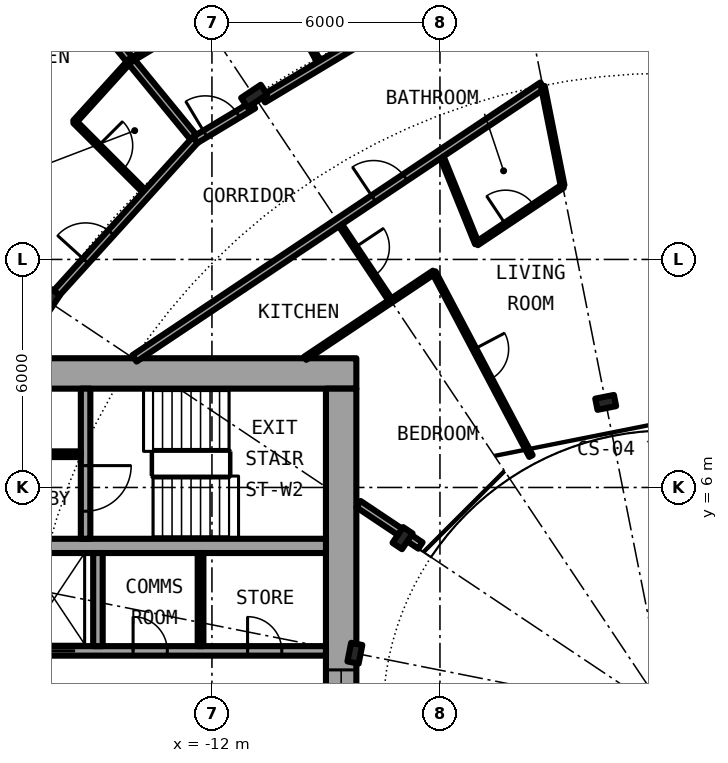
"""IFC4 building model, lengths in metres.
Left out: names, types, materials, properties, quantities, classifications, styles, units other than length and angle.
Written with IfcOpenShell. Run it as: python <this file> out.ifc"""

import sys

from ifc_helpers import new_model, si_unit, direction, frame, frame_2d, origin, origin_2d, place, context, subcontext, project, spatial, rectangle, i_section, extrude, element, fill, save


model = new_model("IFC4")
c1 = context("Model", 3, precision=1e-05, world=origin(), true_north=direction((0.0, 1.0)))
c2 = subcontext(c1, "Body", "Model", "MODEL_VIEW")
j1 = project(units=[si_unit("LENGTHUNIT", "METRE"), si_unit("PLANEANGLEUNIT", "RADIAN")], contexts=[c1])
p1 = place(None, origin())
s1 = spatial("IfcSite", under=j1, at=p1, CompositionType="ELEMENT")
p2 = place(p1, origin())
s2 = spatial("IfcBuilding", under=s1, at=p2, CompositionType="ELEMENT")
p3 = place(p2, frame((0.0, 0.0, 31.95)))
s3 = spatial("IfcBuildingStorey", under=s2, at=p3, CompositionType="ELEMENT", Elevation=31.95)
for number, where, z_axis, x_axis in (
    (1, (-10.889, 16.297, 0.0), (0.0, 0.0, 1.0), (-0.556, 0.831, 0.0)),
    (2, (-16.297, 10.889, 0.0), (0.0, 0.0, 1.0), (-0.831, 0.556, 0.0)),
):
    element("IfcColumn", number, at=place(p3, frame(where, z_axis=z_axis, x_axis=x_axis)), inside=s3, PredefinedType="COLUMN", context=c2, shape_type="SweptSolid", body=[
        extrude(i_section(OverallWidth=0.305, OverallDepth=0.62, WebThickness=0.021, FlangeThickness=0.04, FilletRadius=0.027, at=origin_2d()), origin(), (0.0, 0.0, 1.0), 3.05),
    ])
for number, where, z_axis, x_axis in (
    (3, (-1.639, 8.239, 0.0), (0.0, 0.0, 1.0), (-0.195, 0.981, 0.0)),
    (4, (-6.984, 4.667, 0.0), (0.0, 0.0, 1.0), (-0.831, 0.556, 0.0)),
    (5, (-8.239, 1.639, 0.0), (0.0, 0.0, 1.0), (-0.981, 0.195, 0.0)),
):
    element("IfcColumn", number, at=place(p3, frame(where, z_axis=z_axis, x_axis=x_axis)), inside=s3, PredefinedType="COLUMN", context=c2, shape_type="SweptSolid", body=[
        extrude(i_section(OverallWidth=0.3, OverallDepth=0.5, WebThickness=0.014, FlangeThickness=0.028, FilletRadius=0.027, at=origin_2d()), origin(), (0.0, 0.0, 1.0), 3.05),
    ])
p4 = place(p3, frame((-8.2, 9.0, 0.0), z_axis=(0.0, 0.0, 1.0), x_axis=(-1.0, 0.0, 0.0)))
e6 = element("IfcWall", 6, at=p4, inside=s3, PredefinedType="SHEAR", context=c2, shape_type="SweptSolid", body=[
    extrude(rectangle(XDim=14.2, YDim=0.8, at=frame_2d((7.1, 0.0))), origin(), (0.0, 0.0, 1.0), 3.05),
])
p5 = place(p4, frame((11.675, 0.0, 0.0)))
e7 = element("IfcOpeningElement", 7, at=p5, cuts=e6, PredefinedType="OPENING", context=c2, shape_type="SweptSolid", body=[
    extrude(rectangle(XDim=1.2, YDim=2.3, at=frame_2d((0.6, 1.15))), frame((0.0, 0.41, 0.0), z_axis=(0.0, -1.0, 0.0), x_axis=(1.0, 0.0, 0.0)), (0.0, 0.0, 1.0), 0.82),
])
p6 = place(p3, frame((-8.6, 8.6, 0.0), z_axis=(0.0, 0.0, 1.0), x_axis=(0.0, -1.0, 0.0)))
e8 = element("IfcWall", 8, at=p6, inside=s3, PredefinedType="SHEAR", context=c2, shape_type="SweptSolid", body=[
    extrude(rectangle(XDim=17.2, YDim=0.8, at=frame_2d((8.6, 0.0))), origin(), (0.0, 0.0, 1.0), 3.05),
])
p7 = place(p6, frame((7.4, 0.0, 0.1)))
e9 = element("IfcOpeningElement", 9, at=p7, cuts=e8, PredefinedType="OPENING", context=c2, shape_type="SweptSolid", body=[
    extrude(rectangle(XDim=2.4, YDim=2.2, at=frame_2d((1.2, 1.1))), frame((0.0, 0.41, 0.0), z_axis=(0.0, -1.0, 0.0), x_axis=(1.0, 0.0, 0.0)), (0.0, 0.0, 1.0), 0.82),
])
p8 = place(p3, frame((-19.15, 1.7, 0.0), z_axis=(0.0, 0.0, 1.0), x_axis=(1.0, 0.0, 0.0)))
e10 = element("IfcWall", 10, at=p8, inside=s3, PredefinedType="SHEAR", context=c2, shape_type="SweptSolid", body=[
    extrude(rectangle(XDim=10.15, YDim=0.25, at=frame_2d((5.075, 0.0))), origin(), (0.0, 0.0, 1.0), 3.05),
])
p9 = place(p8, frame((2.45, 0.0, 0.0)))
e11 = element("IfcOpeningElement", 11, at=p9, cuts=e10, PredefinedType="OPENING", context=c2, shape_type="SweptSolid", body=[
    extrude(rectangle(XDim=1.1, YDim=2.3, at=frame_2d((0.55, 1.15))), frame((0.0, 0.135, 0.0), z_axis=(0.0, -1.0, 0.0), x_axis=(1.0, 0.0, 0.0)), (0.0, 0.0, 1.0), 0.27),
])
p10 = place(p8, frame((8.087, 0.0, 0.0)))
e12 = element("IfcOpeningElement", 12, at=p10, cuts=e10, PredefinedType="OPENING", context=c2, shape_type="SweptSolid", body=[
    extrude(rectangle(XDim=0.9, YDim=2.3, at=frame_2d((0.45, 1.15))), frame((0.0, 0.135, 0.0), z_axis=(0.0, -1.0, 0.0), x_axis=(1.0, 0.0, 0.0)), (0.0, 0.0, 1.0), 0.27),
])
p11 = place(p8, frame((5.075, 0.0, 0.0)))
e13 = element("IfcOpeningElement", 13, at=p11, cuts=e10, PredefinedType="OPENING", context=c2, shape_type="SweptSolid", body=[
    extrude(rectangle(XDim=0.9, YDim=2.3, at=frame_2d((0.45, 1.15))), frame((0.0, 0.135, 0.0), z_axis=(0.0, -1.0, 0.0), x_axis=(1.0, 0.0, 0.0)), (0.0, 0.0, 1.0), 0.27),
])
p12 = place(p3, frame((-9.0, 4.462, 0.0), z_axis=(0.0, 0.0, 1.0), x_axis=(-1.0, 0.0, 0.0)))
e14 = element("IfcWall", 14, at=p12, inside=s3, PredefinedType="SHEAR", context=c2, shape_type="SweptSolid", body=[
    extrude(rectangle(XDim=10.15, YDim=0.375, at=frame_2d((5.075, 0.0))), origin(), (0.0, 0.0, 1.0), 3.05),
])
p13 = place(p3, frame((-15.325, 8.6, 0.0), z_axis=(0.0, 0.0, 1.0), x_axis=(0.0, -1.0, 0.0)))
e15 = element("IfcWall", 15, at=p13, inside=s3, PredefinedType="SHEAR", context=c2, shape_type="SweptSolid", body=[
    extrude(rectangle(XDim=3.95, YDim=0.25, at=frame_2d((1.975, 0.0))), origin(), (0.0, 0.0, 1.0), 3.05),
])
p14 = place(p13, frame((2.025, 0.0, 0.0)))
e16 = element("IfcOpeningElement", 16, at=p14, cuts=e15, PredefinedType="OPENING", context=c2, shape_type="SweptSolid", body=[
    extrude(rectangle(XDim=1.2, YDim=2.3, at=frame_2d((0.6, 1.15))), frame((0.0, 0.135, 0.0), z_axis=(0.0, -1.0, 0.0), x_axis=(1.0, 0.0, 0.0)), (0.0, 0.0, 1.0), 0.27),
])
p15 = place(p3, frame((-15.0, 1.825, 0.0), z_axis=(0.0, 0.0, 1.0), x_axis=(0.0, 1.0, 0.0)))
e17 = element("IfcWall", 17, at=p15, inside=s3, PredefinedType="SOLIDWALL", context=c2, shape_type="SweptSolid", body=[
    extrude(rectangle(XDim=2.45, YDim=0.25, at=frame_2d((1.225, 0.0))), origin(), (0.0, 0.0, 1.0), 2.7),
])
p16 = place(p3, frame((-12.3, 1.825, 0.0), z_axis=(0.0, 0.0, 1.0), x_axis=(0.0, 1.0, 0.0)))
e18 = element("IfcWall", 18, at=p16, inside=s3, PredefinedType="PARTITIONING", context=c2, shape_type="SweptSolid", body=[
    extrude(rectangle(XDim=2.45, YDim=0.15, at=frame_2d((1.225, 0.0))), origin(), (0.0, 0.0, 1.0), 2.7),
])
p17 = place(p3, frame((-15.45, 6.875, 0.0), z_axis=(0.0, 0.0, 1.0), x_axis=(-1.0, 0.0, 0.0)))
e19 = element("IfcWall", 19, at=p17, inside=s3, PredefinedType="PARTITIONING", context=c2, shape_type="SweptSolid", body=[
    extrude(rectangle(XDim=3.7, YDim=0.15, at=frame_2d((1.85, 0.0))), origin(), (0.0, 0.0, 1.0), 2.7),
])
p18 = place(p17, frame((1.4, 0.0, 0.0)))
e20 = element("IfcOpeningElement", 20, at=p18, cuts=e19, PredefinedType="OPENING", context=c2, shape_type="SweptSolid", body=[
    extrude(rectangle(XDim=0.9, YDim=2.3, at=frame_2d((0.45, 1.15))), frame((0.0, 0.085, 0.0), z_axis=(0.0, -1.0, 0.0), x_axis=(1.0, 0.0, 0.0)), (0.0, 0.0, 1.0), 0.17),
])
p19 = place(p3, frame((-17.24, 21.007, 0.0), z_axis=(0.0, 0.0, 1.0), x_axis=(0.634381303318, -0.773020285633, 0.0)))
e21 = element("IfcWall", 21, at=p19, inside=s3, PredefinedType="PARTITIONING", context=c2, shape_type="SweptSolid", body=[
    extrude(rectangle(XDim=7.576, YDim=0.2, at=frame_2d((3.788, 0.0))), origin(), (0.0, 0.0, 1.0), 2.7),
])
p20 = place(p3, frame((-15.612, 15.622, 0.0), z_axis=(0.0, 0.0, 1.0), x_axis=(0.706741540154, -0.707471833659, 0.0)))
e22 = element("IfcWall", 22, at=p20, inside=s3, PredefinedType="PARTITIONING", context=c2, shape_type="SweptSolid", body=[
    extrude(rectangle(XDim=2.674, YDim=0.1, at=frame_2d((1.337, 0.0))), origin(), (0.0, 0.0, 1.0), 2.7),
])
p21 = place(p20, frame((0.887, 0.0, 0.0)))
e23 = element("IfcOpeningElement", 23, at=p21, cuts=e22, PredefinedType="OPENING", context=c2, shape_type="SweptSolid", body=[
    extrude(rectangle(XDim=0.9, YDim=2.3, at=frame_2d((0.45, 1.15))), frame((0.0, 0.06, 0.0), z_axis=(0.0, -1.0, 0.0), x_axis=(1.0, 0.0, 0.0)), (0.0, 0.0, 1.0), 0.12),
])
p22 = place(p3, frame((-10.405, 19.481, 0.0), z_axis=(0.0, 0.0, 1.0), x_axis=(0.471151994359, -0.882052038267, 0.0)))
e24 = element("IfcWall", 24, at=p22, inside=s3, PredefinedType="PARTITIONING", context=c2, shape_type="SweptSolid", body=[
    extrude(rectangle(XDim=2.674, YDim=0.1, at=frame_2d((1.337, 0.0))), origin(), (0.0, 0.0, 1.0), 2.7),
])
p23 = place(p22, frame((0.887, 0.0, 0.0)))
e25 = element("IfcOpeningElement", 25, at=p23, cuts=e24, PredefinedType="OPENING", context=c2, shape_type="SweptSolid", body=[
    extrude(rectangle(XDim=0.9, YDim=2.3, at=frame_2d((0.45, 1.15))), frame((0.0, 0.06, 0.0), z_axis=(0.0, -1.0, 0.0), x_axis=(1.0, 0.0, 0.0)), (0.0, 0.0, 1.0), 0.12),
])
p24 = place(p3, frame((-8.674, 12.982, 0.0), z_axis=(0.0, 0.0, 1.0), x_axis=(0.555355163998, -0.831613276602, 0.0)))
e26 = element("IfcWall", 26, at=p24, inside=s3, PredefinedType="PARTITIONING", context=c2, shape_type="SweptSolid", body=[
    extrude(rectangle(XDim=2.494, YDim=0.1, at=frame_2d((1.247, 0.0))), origin(), (0.0, 0.0, 1.0), 2.7),
])
p25 = place(p24, frame((0.797, 0.0, 0.0)))
e27 = element("IfcOpeningElement", 27, at=p25, cuts=e26, PredefinedType="OPENING", context=c2, shape_type="SweptSolid", body=[
    extrude(rectangle(XDim=0.9, YDim=2.3, at=frame_2d((0.45, 1.15))), frame((0.0, 0.06, 0.0), z_axis=(0.0, -1.0, 0.0), x_axis=(1.0, 0.0, 0.0)), (0.0, 0.0, 1.0), 0.12),
])
p26 = place(p3, frame((-6.16, 11.663, 0.0), z_axis=(0.0, 0.0, 1.0), x_axis=(0.466976820365, -0.884269556889, 0.0)))
e28 = element("IfcWall", 28, at=p26, inside=s3, PredefinedType="PARTITIONING", context=c2, shape_type="SweptSolid", body=[
    extrude(rectangle(XDim=5.469, YDim=0.1, at=frame_2d((2.735, 0.0))), origin(), (0.0, 0.0, 1.0), 2.7),
])
p27 = place(p26, frame((2.285, 0.0, 0.0)))
e29 = element("IfcOpeningElement", 29, at=p27, cuts=e28, PredefinedType="OPENING", context=c2, shape_type="SweptSolid", body=[
    extrude(rectangle(XDim=0.9, YDim=2.3, at=frame_2d((0.45, 1.15))), frame((0.0, 0.06, 0.0), z_axis=(0.0, -1.0, 0.0), x_axis=(1.0, 0.0, 0.0)), (0.0, 0.0, 1.0), 0.12),
])
p28 = place(p3, frame((-5.986, 14.779, 0.0), z_axis=(0.0, 0.0, 1.0), x_axis=(0.375649498413, -0.926761811008, 0.0)))
e30 = element("IfcWall", 30, at=p28, inside=s3, PredefinedType="PARTITIONING", context=c2, shape_type="SweptSolid", body=[
    extrude(rectangle(XDim=2.548, YDim=0.1, at=frame_2d((1.274, 0.0))), origin(), (0.0, 0.0, 1.0), 2.7),
])
p29 = place(p3, frame((-6.513, 4.472, 0.0), z_axis=(0.0, 0.0, 1.0), x_axis=(-0.831417956244, 0.555647533996, 0.0)))
e31 = element("IfcWall", 31, at=p29, inside=s3, PredefinedType="PARTITIONING", context=c2, shape_type="SweptSolid", body=[
    extrude(rectangle(XDim=1.962, YDim=0.2, at=frame_2d((0.981, 0.0))), origin(), (0.0, 0.0, 1.0), 2.7),
])
p30 = place(p3, frame((-9.546, 9.4, 0.0), z_axis=(0.0, 0.0, 1.0), x_axis=(0.831459707426, 0.555585056429, 0.0)))
e32 = element("IfcWall", 32, at=p30, inside=s3, PredefinedType="PARTITIONING", context=c2, shape_type="SweptSolid", body=[
    extrude(rectangle(XDim=4.073, YDim=0.1, at=frame_2d((2.037, 0.0))), origin(), (0.0, 0.0, 1.0), 2.7),
])
p31 = place(p3, frame((-5.03, 12.417, 0.0), z_axis=(0.0, 0.0, 1.0), x_axis=(0.831538390496, 0.555467285384, 0.0)))
e33 = element("IfcWall", 33, at=p31, inside=s3, PredefinedType="PARTITIONING", context=c2, shape_type="SweptSolid", body=[
    extrude(rectangle(XDim=2.717, YDim=0.1, at=frame_2d((1.358, 0.0))), origin(), (0.0, 0.0, 1.0), 2.7),
])
p32 = place(p31, frame((0.91, 0.0, 0.0)))
e34 = element("IfcOpeningElement", 34, at=p32, cuts=e33, PredefinedType="OPENING", context=c2, shape_type="SweptSolid", body=[
    extrude(rectangle(XDim=0.9, YDim=2.3, at=frame_2d((0.45, 1.15))), frame((0.0, 0.06, 0.0), z_axis=(0.0, -1.0, 0.0), x_axis=(1.0, 0.0, 0.0)), (0.0, 0.0, 1.0), 0.12),
])
p33 = place(p3, frame((-14.039, 9.396, 0.0), z_axis=(0.0, 0.0, 1.0), x_axis=(0.831348689697, 0.555751163866, 0.0)))
e35 = element("IfcWall", 35, at=p33, inside=s3, PredefinedType="PARTITIONING", context=c2, shape_type="SweptSolid", body=[
    extrude(rectangle(XDim=12.914, YDim=0.2, at=frame_2d((6.457, 0.0))), origin(), (0.0, 0.0, 1.0), 2.7),
])
p34 = place(p33, frame((7.568, 0.0, 0.0)))
e36 = element("IfcOpeningElement", 36, at=p34, cuts=e35, PredefinedType="OPENING", context=c2, shape_type="SweptSolid", body=[
    extrude(rectangle(XDim=1.0, YDim=2.3, at=frame_2d((0.5, 1.15))), frame((0.0, 0.11, 0.0), z_axis=(0.0, -1.0, 0.0), x_axis=(1.0, 0.0, 0.0)), (0.0, 0.0, 1.0), 0.22),
])
p35 = place(p3, frame((-16.193, 11.003, 0.0), z_axis=(0.0, 0.0, 1.0), x_axis=(0.671514934772, 0.740991020444, 0.0)))
e37 = element("IfcWall", 37, at=p35, inside=s3, PredefinedType="PARTITIONING", context=c2, shape_type="SweptSolid", body=[
    extrude(rectangle(XDim=5.598, YDim=0.2, at=frame_2d((2.799, 0.0))), origin(), (0.0, 0.0, 1.0), 2.38),
])
p36 = place(p35, frame((1.293, 0.0, 0.0)))
e38 = element("IfcOpeningElement", 38, at=p36, cuts=e37, PredefinedType="OPENING", context=c2, shape_type="SweptSolid", body=[
    extrude(rectangle(XDim=1.0, YDim=2.3, at=frame_2d((0.5, 1.15))), frame((0.0, 0.11, 0.0), z_axis=(0.0, -1.0, 0.0), x_axis=(1.0, 0.0, 0.0)), (0.0, 0.0, 1.0), 0.22),
])
p37 = place(p3, frame((-12.439, 15.146, 0.0), z_axis=(0.0, 0.0, 1.0), x_axis=(0.857323214505, 0.514778501757, 0.0)))
e39 = element("IfcWall", 39, at=p37, inside=s3, PredefinedType="PARTITIONING", context=c2, shape_type="SweptSolid", body=[
    extrude(rectangle(XDim=1.778, YDim=0.2, at=frame_2d((0.889, 0.0))), origin(), (0.0, 0.0, 1.0), 2.38),
])
p38 = place(p37, frame((0.307, 0.0, 0.0)))
e40 = element("IfcOpeningElement", 40, at=p38, cuts=e39, PredefinedType="OPENING", context=c2, shape_type="SweptSolid", body=[
    extrude(rectangle(XDim=1.0, YDim=2.3, at=frame_2d((0.5, 1.15))), frame((0.0, 0.11, 0.0), z_axis=(0.0, -1.0, 0.0), x_axis=(1.0, 0.0, 0.0)), (0.0, 0.0, 1.0), 0.22),
])
p39 = place(p3, frame((-10.653, 16.218, 0.0), z_axis=(0.0, 0.0, 1.0), x_axis=(0.857656999296, 0.514222200569, 0.0)))
e41 = element("IfcWall", 41, at=p39, inside=s3, PredefinedType="PARTITIONING", context=c2, shape_type="SweptSolid", body=[
    extrude(rectangle(XDim=3.675, YDim=0.2, at=frame_2d((1.838, 0.0))), origin(), (0.0, 0.0, 1.0), 2.38),
])
p40 = place(p3, frame((-15.613, 15.621, 0.0), z_axis=(0.0, 0.0, 1.0), x_axis=(0.67169789574, 0.740825172937, 0.0)))
e42 = element("IfcWall", 42, at=p40, inside=s3, PredefinedType="PARTITIONING", context=c2, shape_type="SweptSolid", body=[
    extrude(rectangle(XDim=2.183, YDim=0.1, at=frame_2d((1.091, 0.0))), origin(), (0.0, 0.0, 1.0), 2.7),
])
p41 = place(p3, frame((-14.147, 17.237, 0.0), z_axis=(0.0, 0.0, 1.0), x_axis=(0.857660741648, 0.514215958752, 0.0)))
e43 = element("IfcWall", 43, at=p41, inside=s3, PredefinedType="PARTITIONING", context=c2, shape_type="SweptSolid", body=[
    extrude(rectangle(XDim=2.182, YDim=0.1, at=frame_2d((1.091, 0.0))), origin(), (0.0, 0.0, 1.0), 2.7),
])
p42 = place(p3, frame((-3.293, 16.554, 0.0), z_axis=(0.0, 0.0, 1.0), x_axis=(0.195338620417, -0.980735858105, 0.0)))
e44 = element("IfcWall", 44, at=p42, inside=s3, PredefinedType="PARTITIONING", context=c2, shape_type="SweptSolid", body=[
    extrude(rectangle(XDim=2.657, YDim=0.1, at=frame_2d((1.329, 0.0))), origin(), (0.0, 0.0, 1.0), 2.7),
])
p43 = place(p9, origin())
e45 = element("IfcDoor", 45, at=p43, inside=s3, OperationType="DOUBLE_DOOR_SLIDING", PredefinedType="DOOR", context=c2, shape_type="SweptSolid", body=[
    extrude(rectangle(XDim=1.1, YDim=2.3, at=frame_2d((0.55, 1.15))), frame((0.0, 0.025, 0.0), z_axis=(0.0, -1.0, 0.0), x_axis=(1.0, 0.0, 0.0)), (0.0, 0.0, 1.0), 0.05),
])
fill(e11, e45)
p44 = place(p10, origin())
e46 = element("IfcDoor", 46, at=p44, inside=s3, OperationType="SINGLE_SWING_LEFT", PredefinedType="DOOR", context=c2, shape_type="SweptSolid", body=[
    extrude(rectangle(XDim=0.9, YDim=2.3, at=frame_2d((0.45, 1.15))), frame((0.0, 0.025, 0.0), z_axis=(0.0, -1.0, 0.0), x_axis=(1.0, 0.0, 0.0)), (0.0, 0.0, 1.0), 0.05),
])
fill(e12, e46)
p45 = place(p11, origin())
e47 = element("IfcDoor", 47, at=p45, inside=s3, OperationType="SINGLE_SWING_LEFT", PredefinedType="DOOR", context=c2, shape_type="SweptSolid", body=[
    extrude(rectangle(XDim=0.9, YDim=2.3, at=frame_2d((0.45, 1.15))), frame((0.0, 0.025, 0.0), z_axis=(0.0, -1.0, 0.0), x_axis=(1.0, 0.0, 0.0)), (0.0, 0.0, 1.0), 0.05),
])
fill(e13, e47)
p46 = place(p14, origin())
e48 = element("IfcDoor", 48, at=p46, inside=s3, OperationType="SINGLE_SWING_LEFT", PredefinedType="DOOR", context=c2, shape_type="SweptSolid", body=[
    extrude(rectangle(XDim=1.2, YDim=2.3, at=frame_2d((0.6, 1.15))), frame((0.0, 0.025, 0.0), z_axis=(0.0, -1.0, 0.0), x_axis=(1.0, 0.0, 0.0)), (0.0, 0.0, 1.0), 0.05),
])
fill(e16, e48)
p47 = place(p7, origin())
e49 = element("IfcWindow", 49, at=p47, inside=s3, PartitioningType="SINGLE_PANEL", PredefinedType="WINDOW", context=c2, shape_type="SweptSolid", body=[
    extrude(rectangle(XDim=2.4, YDim=2.2, at=frame_2d((1.2, 1.1))), frame((0.0, 0.03, 0.0), z_axis=(0.0, -1.0, 0.0), x_axis=(1.0, 0.0, 0.0)), (0.0, 0.0, 1.0), 0.06),
])
fill(e9, e49)
p48 = place(p38, origin())
e50 = element("IfcDoor", 50, at=p48, inside=s3, OperationType="SINGLE_SWING_LEFT", PredefinedType="DOOR", context=c2, shape_type="SweptSolid", body=[
    extrude(rectangle(XDim=1.0, YDim=2.3, at=frame_2d((0.5, 1.15))), frame((0.0, 0.025, 0.0), z_axis=(0.0, -1.0, 0.0), x_axis=(1.0, 0.0, 0.0)), (0.0, 0.0, 1.0), 0.05),
])
fill(e40, e50)
p49 = place(p36, origin())
e51 = element("IfcDoor", 51, at=p49, inside=s3, OperationType="SINGLE_SWING_LEFT", PredefinedType="DOOR", context=c2, shape_type="SweptSolid", body=[
    extrude(rectangle(XDim=1.0, YDim=2.3, at=frame_2d((0.5, 1.15))), frame((0.0, 0.025, 0.0), z_axis=(0.0, -1.0, 0.0), x_axis=(1.0, 0.0, 0.0)), (0.0, 0.0, 1.0), 0.05),
])
fill(e38, e51)
p50 = place(p21, origin())
e52 = element("IfcDoor", 52, at=p50, inside=s3, OperationType="SINGLE_SWING_RIGHT", PredefinedType="DOOR", context=c2, shape_type="SweptSolid", body=[
    extrude(rectangle(XDim=0.9, YDim=2.3, at=frame_2d((0.45, 1.15))), frame((0.0, 0.025, 0.0), z_axis=(0.0, -1.0, 0.0), x_axis=(1.0, 0.0, 0.0)), (0.0, 0.0, 1.0), 0.05),
])
fill(e23, e52)
p51 = place(p34, origin())
e53 = element("IfcDoor", 53, at=p51, inside=s3, OperationType="SINGLE_SWING_RIGHT", PredefinedType="DOOR", context=c2, shape_type="SweptSolid", body=[
    extrude(rectangle(XDim=1.0, YDim=2.3, at=frame_2d((0.5, 1.15))), frame((0.0, 0.025, 0.0), z_axis=(0.0, -1.0, 0.0), x_axis=(1.0, 0.0, 0.0)), (0.0, 0.0, 1.0), 0.05),
])
fill(e36, e53)
p52 = place(p32, origin())
e54 = element("IfcDoor", 54, at=p52, inside=s3, OperationType="SINGLE_SWING_RIGHT", PredefinedType="DOOR", context=c2, shape_type="SweptSolid", body=[
    extrude(rectangle(XDim=0.9, YDim=2.3, at=frame_2d((0.45, 1.15))), frame((0.0, 0.025, 0.0), z_axis=(0.0, -1.0, 0.0), x_axis=(1.0, 0.0, 0.0)), (0.0, 0.0, 1.0), 0.05),
])
fill(e34, e54)
p53 = place(p25, origin())
e55 = element("IfcDoor", 55, at=p53, inside=s3, OperationType="SINGLE_SWING_RIGHT", PredefinedType="DOOR", context=c2, shape_type="SweptSolid", body=[
    extrude(rectangle(XDim=0.9, YDim=2.3, at=frame_2d((0.45, 1.15))), frame((0.0, 0.025, 0.0), z_axis=(0.0, -1.0, 0.0), x_axis=(1.0, 0.0, 0.0)), (0.0, 0.0, 1.0), 0.05),
])
fill(e27, e55)
p54 = place(p27, origin())
e56 = element("IfcDoor", 56, at=p54, inside=s3, OperationType="SINGLE_SWING_RIGHT", PredefinedType="DOOR", context=c2, shape_type="SweptSolid", body=[
    extrude(rectangle(XDim=0.9, YDim=2.3, at=frame_2d((0.45, 1.15))), frame((0.0, 0.025, 0.0), z_axis=(0.0, -1.0, 0.0), x_axis=(1.0, 0.0, 0.0)), (0.0, 0.0, 1.0), 0.05),
])
fill(e29, e56)
save(model, sys.argv[1])
